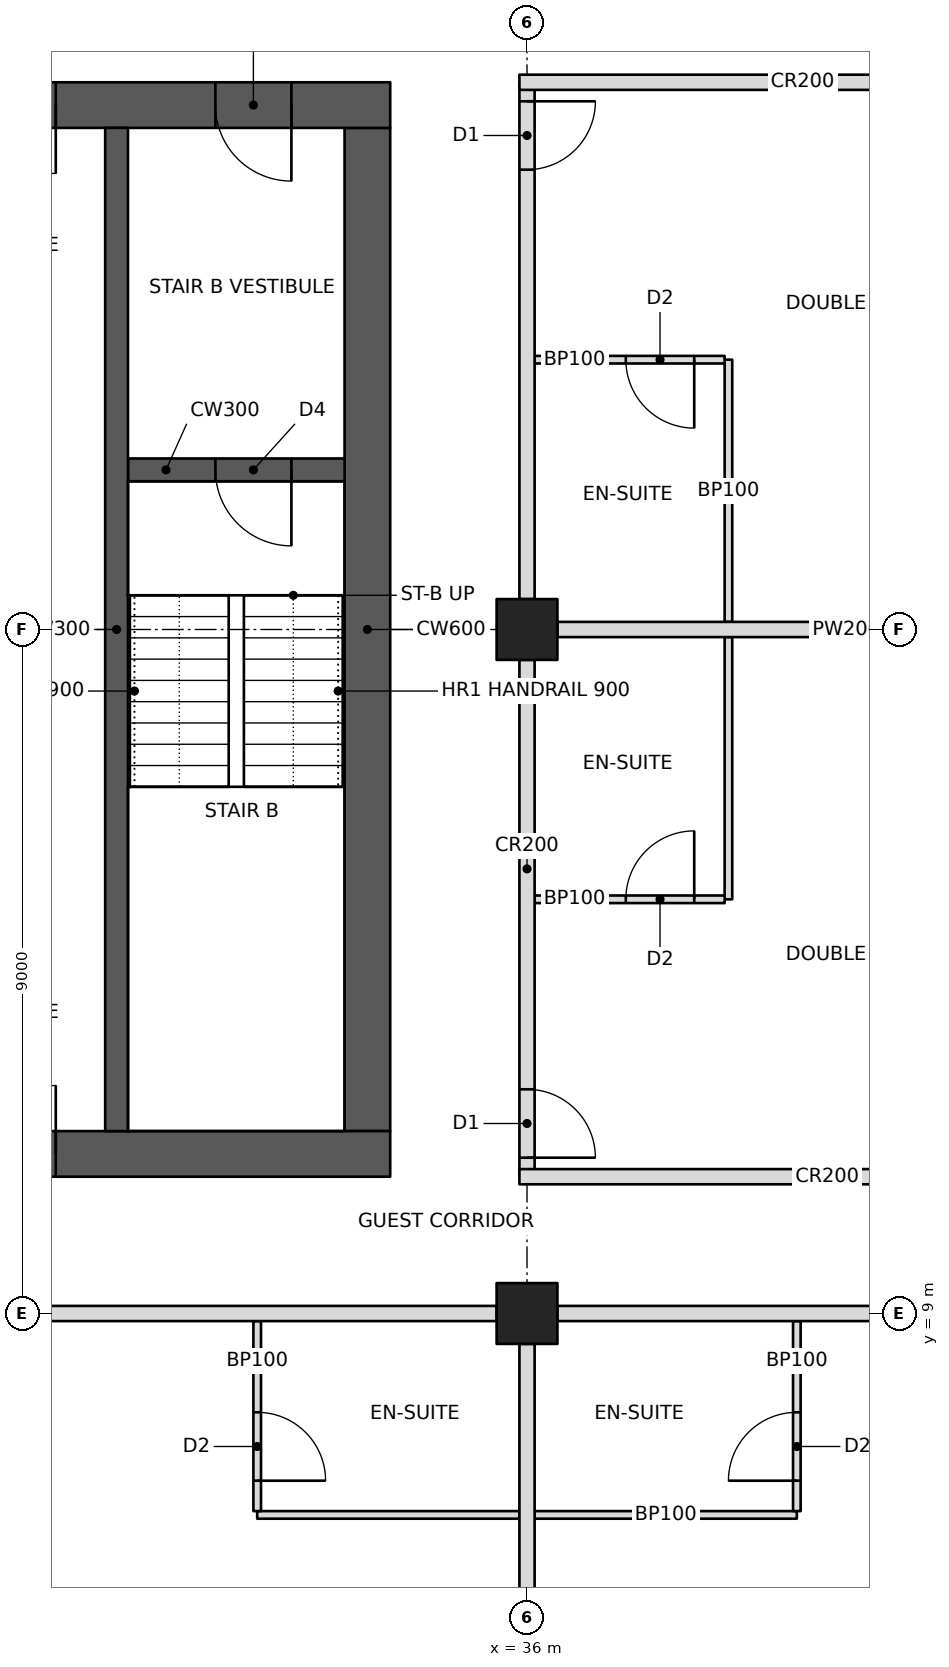
"""IFC4 building model, lengths in metres.
Left out: names, types, materials, properties, quantities, classifications, styles, units other than length and angle.
Written with IfcOpenShell. Run it as: python <this file> out.ifc"""

import sys

from ifc_helpers import new_model, si_unit, direction, frame, frame_2d, origin, origin_2d, place, context, subcontext, project, spatial, rectangle, hollow_rectangle, extrude, element, fill, save


model = new_model("IFC4")
c1 = context("Model", 3, precision=1e-05, world=origin(), true_north=direction((0.0, 1.0)))
c2 = subcontext(c1, "Body", "Model", "MODEL_VIEW")
j1 = project(units=[si_unit("LENGTHUNIT", "METRE"), si_unit("PLANEANGLEUNIT", "RADIAN")], contexts=[c1])
p1 = place(None, origin())
s1 = spatial("IfcSite", under=j1, at=p1, CompositionType="ELEMENT")
p2 = place(p1, origin())
s2 = spatial("IfcBuilding", under=s1, at=p2, CompositionType="ELEMENT")
p3 = place(p2, frame((0.0, 0.0, 191.0)))
s3 = spatial("IfcBuildingStorey", under=s2, at=p3, CompositionType="ELEMENT", Elevation=191.0)
for number, where, z_axis, x_axis in (
    (1, (36.0, 9.0, 0.0), (0.0, 0.0, 1.0), (0.0, 1.0, 0.0)),
    (2, (36.0, 18.0, 0.0), (0.0, 0.0, 1.0), (0.0, 1.0, 0.0)),
):
    element("IfcColumn", number, at=place(p3, frame(where, z_axis=z_axis, x_axis=x_axis)), inside=s3, PredefinedType="COLUMN", context=c2, shape_type="SweptSolid", body=[
        extrude(hollow_rectangle(XDim=0.8, YDim=0.8, WallThickness=0.06, at=origin_2d()), origin(), (0.0, 0.0, 1.0), 3.4),
    ])
p4 = place(p3, frame((10.8, 11.1, 0.0), z_axis=(0.0, 0.0, 1.0), x_axis=(1.0, 0.0, 0.0)))
e3 = element("IfcWall", 3, at=p4, inside=s3, PredefinedType="SHEAR", context=c2, shape_type="SweptSolid", body=[
    extrude(rectangle(XDim=23.4, YDim=0.6, at=frame_2d((11.7, 0.0))), origin(), (0.0, 0.0, 1.0), 3.4),
])
p5 = place(p4, frame((1.0, 0.0, 0.0)))
e4 = element("IfcOpeningElement", 4, at=p5, cuts=e3, PredefinedType="OPENING", context=c2, shape_type="SweptSolid", body=[
    extrude(rectangle(XDim=1.0, YDim=2.1, at=frame_2d((0.5, 1.05))), frame((0.0, 0.31, 0.0), z_axis=(0.0, -1.0, 0.0), x_axis=(1.0, 0.0, 0.0)), (0.0, 0.0, 1.0), 0.62),
])
p6 = place(p4, frame((17.2, 0.0, 0.0)))
e5 = element("IfcOpeningElement", 5, at=p6, cuts=e3, PredefinedType="OPENING", context=c2, shape_type="SweptSolid", body=[
    extrude(rectangle(XDim=1.8, YDim=2.1, at=frame_2d((0.9, 1.05))), frame((0.0, 0.31, 0.0), z_axis=(0.0, -1.0, 0.0), x_axis=(1.0, 0.0, 0.0)), (0.0, 0.0, 1.0), 0.62),
])
p7 = place(p3, frame((10.8, 24.9, 0.0), z_axis=(0.0, 0.0, 1.0), x_axis=(1.0, 0.0, 0.0)))
e6 = element("IfcWall", 6, at=p7, inside=s3, PredefinedType="SHEAR", context=c2, shape_type="SweptSolid", body=[
    extrude(rectangle(XDim=23.4, YDim=0.6, at=frame_2d((11.7, 0.0))), origin(), (0.0, 0.0, 1.0), 3.4),
])
p8 = place(p7, frame((17.2, 0.0, 0.0)))
e7 = element("IfcOpeningElement", 7, at=p8, cuts=e6, PredefinedType="OPENING", context=c2, shape_type="SweptSolid", body=[
    extrude(rectangle(XDim=1.8, YDim=2.1, at=frame_2d((0.9, 1.05))), frame((0.0, 0.31, 0.0), z_axis=(0.0, -1.0, 0.0), x_axis=(1.0, 0.0, 0.0)), (0.0, 0.0, 1.0), 0.62),
])
p9 = place(p7, frame((21.1, 0.0, 0.0)))
e8 = element("IfcOpeningElement", 8, at=p9, cuts=e6, PredefinedType="OPENING", context=c2, shape_type="SweptSolid", body=[
    extrude(rectangle(XDim=1.0, YDim=2.1, at=frame_2d((0.5, 1.05))), frame((0.0, 0.31, 0.0), z_axis=(0.0, -1.0, 0.0), x_axis=(1.0, 0.0, 0.0)), (0.0, 0.0, 1.0), 0.62),
])
p10 = place(p7, frame((4.9, 0.0, 0.0)))
e9 = element("IfcOpeningElement", 9, at=p10, cuts=e6, PredefinedType="OPENING", context=c2, shape_type="SweptSolid", body=[
    extrude(rectangle(XDim=1.0, YDim=2.1, at=frame_2d((0.5, 1.05))), frame((0.0, 0.31, 0.0), z_axis=(0.0, -1.0, 0.0), x_axis=(1.0, 0.0, 0.0)), (0.0, 0.0, 1.0), 0.62),
])
p11 = place(p3, frame((33.9, 11.4, 0.0), z_axis=(0.0, 0.0, 1.0), x_axis=(0.0, 1.0, 0.0)))
e10 = element("IfcWall", 10, at=p11, inside=s3, PredefinedType="SHEAR", context=c2, shape_type="SweptSolid", body=[
    extrude(rectangle(XDim=13.2, YDim=0.6, at=frame_2d((6.6, 0.0))), origin(), (0.0, 0.0, 1.0), 3.4),
])
p12 = place(p3, frame((30.6, 11.4, 0.0), z_axis=(0.0, 0.0, 1.0), x_axis=(0.0, 1.0, 0.0)))
e11 = element("IfcWall", 11, at=p12, inside=s3, PredefinedType="SHEAR", context=c2, shape_type="SweptSolid", body=[
    extrude(rectangle(XDim=13.2, YDim=0.3, at=frame_2d((6.6, 0.0))), origin(), (0.0, 0.0, 1.0), 3.4),
])
p13 = place(p3, frame((30.75, 20.1, 0.0), z_axis=(0.0, 0.0, 1.0), x_axis=(1.0, 0.0, 0.0)))
e12 = element("IfcWall", 12, at=p13, inside=s3, PredefinedType="SHEAR", context=c2, shape_type="SweptSolid", body=[
    extrude(rectangle(XDim=2.85, YDim=0.3, at=frame_2d((1.425, 0.0))), origin(), (0.0, 0.0, 1.0), 3.4),
])
p14 = place(p13, frame((1.15, 0.0, 0.0)))
e13 = element("IfcOpeningElement", 13, at=p14, cuts=e12, PredefinedType="OPENING", context=c2, shape_type="SweptSolid", body=[
    extrude(rectangle(XDim=1.0, YDim=2.1, at=frame_2d((0.5, 1.05))), frame((0.0, 0.16, 0.0), z_axis=(0.0, -1.0, 0.0), x_axis=(1.0, 0.0, 0.0)), (0.0, 0.0, 1.0), 0.32),
])
p15 = place(p3, frame((27.4, 9.0, 0.0), z_axis=(0.0, 0.0, 1.0), x_axis=(1.0, 0.0, 0.0)))
e14 = element("IfcWall", 14, at=p15, inside=s3, PredefinedType="PARTITIONING", context=c2, shape_type="SweptSolid", body=[
    extrude(rectangle(XDim=8.2, YDim=0.2, at=frame_2d((4.1, 0.0))), origin(), (0.0, 0.0, 1.0), 2.405),
])
p16 = place(p15, frame((0.15, 0.0, 0.0)))
e15 = element("IfcOpeningElement", 15, at=p16, cuts=e14, PredefinedType="OPENING", context=c2, shape_type="SweptSolid", body=[
    extrude(rectangle(XDim=0.9, YDim=2.1, at=frame_2d((0.45, 1.05))), frame((0.0, 0.11, 0.0), z_axis=(0.0, -1.0, 0.0), x_axis=(1.0, 0.0, 0.0)), (0.0, 0.0, 1.0), 0.22),
])
p17 = place(p3, frame((36.4, 9.0, 0.0), z_axis=(0.0, 0.0, 1.0), x_axis=(1.0, 0.0, 0.0)))
e16 = element("IfcWall", 16, at=p17, inside=s3, PredefinedType="PARTITIONING", context=c2, shape_type="SweptSolid", body=[
    extrude(rectangle(XDim=7.6, YDim=0.2, at=frame_2d((3.8, 0.0))), origin(), (0.0, 0.0, 1.0), 2.438),
])
p18 = place(p17, frame((6.45, 0.0, 0.0)))
e17 = element("IfcOpeningElement", 17, at=p18, cuts=e16, PredefinedType="OPENING", context=c2, shape_type="SweptSolid", body=[
    extrude(rectangle(XDim=0.9, YDim=2.1, at=frame_2d((0.45, 1.05))), frame((0.0, 0.11, 0.0), z_axis=(0.0, -1.0, 0.0), x_axis=(1.0, 0.0, 0.0)), (0.0, 0.0, 1.0), 0.22),
])
p19 = place(p3, frame((36.0, 10.8, 0.0), z_axis=(0.0, 0.0, 1.0), x_axis=(0.0, 1.0, 0.0)))
e18 = element("IfcWall", 18, at=p19, inside=s3, PredefinedType="PARTITIONING", context=c2, shape_type="SweptSolid", body=[
    extrude(rectangle(XDim=6.8, YDim=0.2, at=frame_2d((3.4, 0.0))), origin(), (0.0, 0.0, 1.0), 2.405),
])
p20 = place(p19, frame((0.25, 0.0, 0.0)))
e19 = element("IfcOpeningElement", 19, at=p20, cuts=e18, PredefinedType="OPENING", context=c2, shape_type="SweptSolid", body=[
    extrude(rectangle(XDim=0.9, YDim=2.1, at=frame_2d((0.45, 1.05))), frame((0.0, 0.11, 0.0), z_axis=(0.0, -1.0, 0.0), x_axis=(1.0, 0.0, 0.0)), (0.0, 0.0, 1.0), 0.22),
])
p21 = place(p3, frame((36.0, 18.4, 0.0), z_axis=(0.0, 0.0, 1.0), x_axis=(0.0, 1.0, 0.0)))
e20 = element("IfcWall", 20, at=p21, inside=s3, PredefinedType="PARTITIONING", context=c2, shape_type="SweptSolid", body=[
    extrude(rectangle(XDim=6.8, YDim=0.2, at=frame_2d((3.4, 0.0))), origin(), (0.0, 0.0, 1.0), 2.405),
])
p22 = place(p21, frame((5.65, 0.0, 0.0)))
e21 = element("IfcOpeningElement", 21, at=p22, cuts=e20, PredefinedType="OPENING", context=c2, shape_type="SweptSolid", body=[
    extrude(rectangle(XDim=0.9, YDim=2.1, at=frame_2d((0.45, 1.05))), frame((0.0, 0.11, 0.0), z_axis=(0.0, -1.0, 0.0), x_axis=(1.0, 0.0, 0.0)), (0.0, 0.0, 1.0), 0.22),
])
p23 = place(p3, frame((35.9, 10.8, 0.0), z_axis=(0.0, 0.0, 1.0), x_axis=(1.0, 0.0, 0.0)))
e22 = element("IfcWall", 22, at=p23, inside=s3, PredefinedType="PARTITIONING", context=c2, shape_type="SweptSolid", body=[
    extrude(rectangle(XDim=8.1, YDim=0.2, at=frame_2d((4.05, 0.0))), origin(), (0.0, 0.0, 1.0), 2.404),
])
p24 = place(p3, frame((35.9, 25.2, 0.0), z_axis=(0.0, 0.0, 1.0), x_axis=(1.0, 0.0, 0.0)))
e23 = element("IfcWall", 23, at=p24, inside=s3, PredefinedType="PARTITIONING", context=c2, shape_type="SweptSolid", body=[
    extrude(rectangle(XDim=7.45, YDim=0.2, at=frame_2d((3.725, 0.0))), origin(), (0.0, 0.0, 1.0), 2.404),
])
p25 = place(p3, frame((36.0, 8.6, 0.0), z_axis=(0.0, 0.0, 1.0), x_axis=(0.0, -1.0, 0.0)))
e24 = element("IfcWall", 24, at=p25, inside=s3, PredefinedType="PARTITIONING", context=c2, shape_type="SweptSolid", body=[
    extrude(rectangle(XDim=7.6, YDim=0.2, at=frame_2d((3.8, 0.0))), origin(), (0.0, 0.0, 1.0), 2.438),
])
p26 = place(p3, frame((32.45, 6.35, 0.0), z_axis=(0.0, 0.0, 1.0), x_axis=(1.0, 0.0, 0.0)))
e25 = element("IfcWall", 25, at=p26, inside=s3, PredefinedType="PARTITIONING", context=c2, shape_type="SweptSolid", body=[
    extrude(rectangle(XDim=3.45, YDim=0.1, at=frame_2d((1.725, 0.0))), origin(), (0.0, 0.0, 1.0), 2.438),
])
p27 = place(p3, frame((32.45, 8.9, 0.0), z_axis=(0.0, 0.0, 1.0), x_axis=(0.0, -1.0, 0.0)))
e26 = element("IfcWall", 26, at=p27, inside=s3, PredefinedType="PARTITIONING", context=c2, shape_type="SweptSolid", body=[
    extrude(rectangle(XDim=2.5, YDim=0.1, at=frame_2d((1.25, 0.0))), origin(), (0.0, 0.0, 1.0), 2.404),
])
p28 = place(p27, frame((1.2, 0.0, 0.0)))
e27 = element("IfcOpeningElement", 27, at=p28, cuts=e26, PredefinedType="OPENING", context=c2, shape_type="SweptSolid", body=[
    extrude(rectangle(XDim=0.9, YDim=2.1, at=frame_2d((0.45, 1.05))), frame((0.0, 0.06, 0.0), z_axis=(0.0, -1.0, 0.0), x_axis=(1.0, 0.0, 0.0)), (0.0, 0.0, 1.0), 0.12),
])
p29 = place(p3, frame((36.1, 6.35, 0.0), z_axis=(0.0, 0.0, 1.0), x_axis=(1.0, 0.0, 0.0)))
e28 = element("IfcWall", 28, at=p29, inside=s3, PredefinedType="PARTITIONING", context=c2, shape_type="SweptSolid", body=[
    extrude(rectangle(XDim=3.45, YDim=0.1, at=frame_2d((1.725, 0.0))), origin(), (0.0, 0.0, 1.0), 2.438),
])
p30 = place(p3, frame((39.55, 8.9, 0.0), z_axis=(0.0, 0.0, 1.0), x_axis=(0.0, -1.0, 0.0)))
e29 = element("IfcWall", 29, at=p30, inside=s3, PredefinedType="PARTITIONING", context=c2, shape_type="SweptSolid", body=[
    extrude(rectangle(XDim=2.5, YDim=0.1, at=frame_2d((1.25, 0.0))), origin(), (0.0, 0.0, 1.0), 2.438),
])
p31 = place(p30, frame((1.2, 0.0, 0.0)))
e30 = element("IfcOpeningElement", 30, at=p31, cuts=e29, PredefinedType="OPENING", context=c2, shape_type="SweptSolid", body=[
    extrude(rectangle(XDim=0.9, YDim=2.1, at=frame_2d((0.45, 1.05))), frame((0.0, 0.06, 0.0), z_axis=(0.0, -1.0, 0.0), x_axis=(1.0, 0.0, 0.0)), (0.0, 0.0, 1.0), 0.12),
])
p32 = place(p3, frame((36.4, 18.0, 0.0), z_axis=(0.0, 0.0, 1.0), x_axis=(1.0, 0.0, 0.0)))
e31 = element("IfcWall", 31, at=p32, inside=s3, PredefinedType="PARTITIONING", context=c2, shape_type="SweptSolid", body=[
    extrude(rectangle(XDim=7.6, YDim=0.2, at=frame_2d((3.8, 0.0))), origin(), (0.0, 0.0, 1.0), 2.405),
])
p33 = place(p3, frame((38.65, 14.45, 0.0), z_axis=(0.0, 0.0, 1.0), x_axis=(0.0, 1.0, 0.0)))
e32 = element("IfcWall", 32, at=p33, inside=s3, PredefinedType="PARTITIONING", context=c2, shape_type="SweptSolid", body=[
    extrude(rectangle(XDim=3.45, YDim=0.1, at=frame_2d((1.725, 0.0))), origin(), (0.0, 0.0, 1.0), 2.404),
])
p34 = place(p3, frame((36.1, 14.45, 0.0), z_axis=(0.0, 0.0, 1.0), x_axis=(1.0, 0.0, 0.0)))
e33 = element("IfcWall", 33, at=p34, inside=s3, PredefinedType="PARTITIONING", context=c2, shape_type="SweptSolid", body=[
    extrude(rectangle(XDim=2.5, YDim=0.1, at=frame_2d((1.25, 0.0))), origin(), (0.0, 0.0, 1.0), 2.404),
])
p35 = place(p34, frame((1.2, 0.0, 0.0)))
e34 = element("IfcOpeningElement", 34, at=p35, cuts=e33, PredefinedType="OPENING", context=c2, shape_type="SweptSolid", body=[
    extrude(rectangle(XDim=0.9, YDim=2.1, at=frame_2d((0.45, 1.05))), frame((0.0, 0.06, 0.0), z_axis=(0.0, -1.0, 0.0), x_axis=(1.0, 0.0, 0.0)), (0.0, 0.0, 1.0), 0.12),
])
p36 = place(p3, frame((38.65, 18.1, 0.0), z_axis=(0.0, 0.0, 1.0), x_axis=(0.0, 1.0, 0.0)))
e35 = element("IfcWall", 35, at=p36, inside=s3, PredefinedType="PARTITIONING", context=c2, shape_type="SweptSolid", body=[
    extrude(rectangle(XDim=3.45, YDim=0.1, at=frame_2d((1.725, 0.0))), origin(), (0.0, 0.0, 1.0), 2.404),
])
p37 = place(p3, frame((36.1, 21.55, 0.0), z_axis=(0.0, 0.0, 1.0), x_axis=(1.0, 0.0, 0.0)))
e36 = element("IfcWall", 36, at=p37, inside=s3, PredefinedType="PARTITIONING", context=c2, shape_type="SweptSolid", body=[
    extrude(rectangle(XDim=2.5, YDim=0.1, at=frame_2d((1.25, 0.0))), origin(), (0.0, 0.0, 1.0), 2.404),
])
p38 = place(p37, frame((1.2, 0.0, 0.0)))
e37 = element("IfcOpeningElement", 37, at=p38, cuts=e36, PredefinedType="OPENING", context=c2, shape_type="SweptSolid", body=[
    extrude(rectangle(XDim=0.9, YDim=2.1, at=frame_2d((0.45, 1.05))), frame((0.0, 0.06, 0.0), z_axis=(0.0, -1.0, 0.0), x_axis=(1.0, 0.0, 0.0)), (0.0, 0.0, 1.0), 0.12),
])
p39 = place(p28, origin())
e38 = element("IfcDoor", 38, at=p39, inside=s3, OperationType="SINGLE_SWING_RIGHT", PredefinedType="DOOR", context=c2, shape_type="SweptSolid", body=[
    extrude(rectangle(XDim=0.9, YDim=2.1, at=frame_2d((0.45, 1.05))), frame((0.0, 0.025, 0.0), z_axis=(0.0, -1.0, 0.0), x_axis=(1.0, 0.0, 0.0)), (0.0, 0.0, 1.0), 0.05),
])
fill(e27, e38)
p40 = place(p31, frame((0.9, 0.0, 0.0), z_axis=(0.0, 0.0, 1.0), x_axis=(-1.0, 0.0, 0.0)))
e39 = element("IfcDoor", 39, at=p40, inside=s3, OperationType="SINGLE_SWING_LEFT", PredefinedType="DOOR", context=c2, shape_type="SweptSolid", body=[
    extrude(rectangle(XDim=0.9, YDim=2.1, at=frame_2d((0.45, 1.05))), frame((0.0, 0.025, 0.0), z_axis=(0.0, -1.0, 0.0), x_axis=(1.0, 0.0, 0.0)), (0.0, 0.0, 1.0), 0.05),
])
fill(e30, e39)
p41 = place(p35, origin())
e40 = element("IfcDoor", 40, at=p41, inside=s3, OperationType="SINGLE_SWING_RIGHT", PredefinedType="DOOR", context=c2, shape_type="SweptSolid", body=[
    extrude(rectangle(XDim=0.9, YDim=2.1, at=frame_2d((0.45, 1.05))), frame((0.0, 0.025, 0.0), z_axis=(0.0, -1.0, 0.0), x_axis=(1.0, 0.0, 0.0)), (0.0, 0.0, 1.0), 0.05),
])
fill(e34, e40)
p42 = place(p20, frame((0.9, 0.0, 0.0), z_axis=(0.0, 0.0, 1.0), x_axis=(-1.0, 0.0, 0.0)))
e41 = element("IfcDoor", 41, at=p42, inside=s3, OperationType="SINGLE_SWING_RIGHT", PredefinedType="DOOR", context=c2, shape_type="SweptSolid", body=[
    extrude(rectangle(XDim=0.9, YDim=2.1, at=frame_2d((0.45, 1.05))), frame((0.0, 0.025, 0.0), z_axis=(0.0, -1.0, 0.0), x_axis=(1.0, 0.0, 0.0)), (0.0, 0.0, 1.0), 0.05),
])
fill(e19, e41)
p43 = place(p38, frame((0.9, 0.0, 0.0), z_axis=(0.0, 0.0, 1.0), x_axis=(-1.0, 0.0, 0.0)))
e42 = element("IfcDoor", 42, at=p43, inside=s3, OperationType="SINGLE_SWING_LEFT", PredefinedType="DOOR", context=c2, shape_type="SweptSolid", body=[
    extrude(rectangle(XDim=0.9, YDim=2.1, at=frame_2d((0.45, 1.05))), frame((0.0, 0.025, 0.0), z_axis=(0.0, -1.0, 0.0), x_axis=(1.0, 0.0, 0.0)), (0.0, 0.0, 1.0), 0.05),
])
fill(e37, e42)
p44 = place(p22, frame((0.9, 0.0, 0.0), z_axis=(0.0, 0.0, 1.0), x_axis=(-1.0, 0.0, 0.0)))
e43 = element("IfcDoor", 43, at=p44, inside=s3, OperationType="SINGLE_SWING_LEFT", PredefinedType="DOOR", context=c2, shape_type="SweptSolid", body=[
    extrude(rectangle(XDim=0.9, YDim=2.1, at=frame_2d((0.45, 1.05))), frame((0.0, 0.025, 0.0), z_axis=(0.0, -1.0, 0.0), x_axis=(1.0, 0.0, 0.0)), (0.0, 0.0, 1.0), 0.05),
])
fill(e21, e43)
p45 = place(p6, origin())
e44 = element("IfcDoor", 44, at=p45, inside=s3, OperationType="DOUBLE_DOOR_SINGLE_SWING", PredefinedType="DOOR", context=c2, shape_type="SweptSolid", body=[
    extrude(rectangle(XDim=1.8, YDim=2.1, at=frame_2d((0.9, 1.05))), frame((0.0, 0.025, 0.0), z_axis=(0.0, -1.0, 0.0), x_axis=(1.0, 0.0, 0.0)), (0.0, 0.0, 1.0), 0.05),
])
fill(e5, e44)
p46 = place(p8, frame((1.8, 0.0, 0.0), z_axis=(0.0, 0.0, 1.0), x_axis=(-1.0, 0.0, 0.0)))
e45 = element("IfcDoor", 45, at=p46, inside=s3, OperationType="DOUBLE_DOOR_SINGLE_SWING", PredefinedType="DOOR", context=c2, shape_type="SweptSolid", body=[
    extrude(rectangle(XDim=1.8, YDim=2.1, at=frame_2d((0.9, 1.05))), frame((0.0, 0.025, 0.0), z_axis=(0.0, -1.0, 0.0), x_axis=(1.0, 0.0, 0.0)), (0.0, 0.0, 1.0), 0.05),
])
fill(e7, e45)
p47 = place(p9, frame((1.0, 0.0, 0.0), z_axis=(0.0, 0.0, 1.0), x_axis=(-1.0, 0.0, 0.0)))
e46 = element("IfcDoor", 46, at=p47, inside=s3, OperationType="SINGLE_SWING_LEFT", PredefinedType="DOOR", context=c2, shape_type="SweptSolid", body=[
    extrude(rectangle(XDim=1.0, YDim=2.1, at=frame_2d((0.5, 1.05))), frame((0.0, 0.025, 0.0), z_axis=(0.0, -1.0, 0.0), x_axis=(1.0, 0.0, 0.0)), (0.0, 0.0, 1.0), 0.05),
])
fill(e8, e46)
p48 = place(p14, frame((1.0, 0.0, 0.0), z_axis=(0.0, 0.0, 1.0), x_axis=(-1.0, 0.0, 0.0)))
e47 = element("IfcDoor", 47, at=p48, inside=s3, OperationType="SINGLE_SWING_LEFT", PredefinedType="DOOR", context=c2, shape_type="SweptSolid", body=[
    extrude(rectangle(XDim=1.0, YDim=2.1, at=frame_2d((0.5, 1.05))), frame((0.0, 0.025, 0.0), z_axis=(0.0, -1.0, 0.0), x_axis=(1.0, 0.0, 0.0)), (0.0, 0.0, 1.0), 0.05),
])
fill(e13, e47)
save(model, sys.argv[1])
